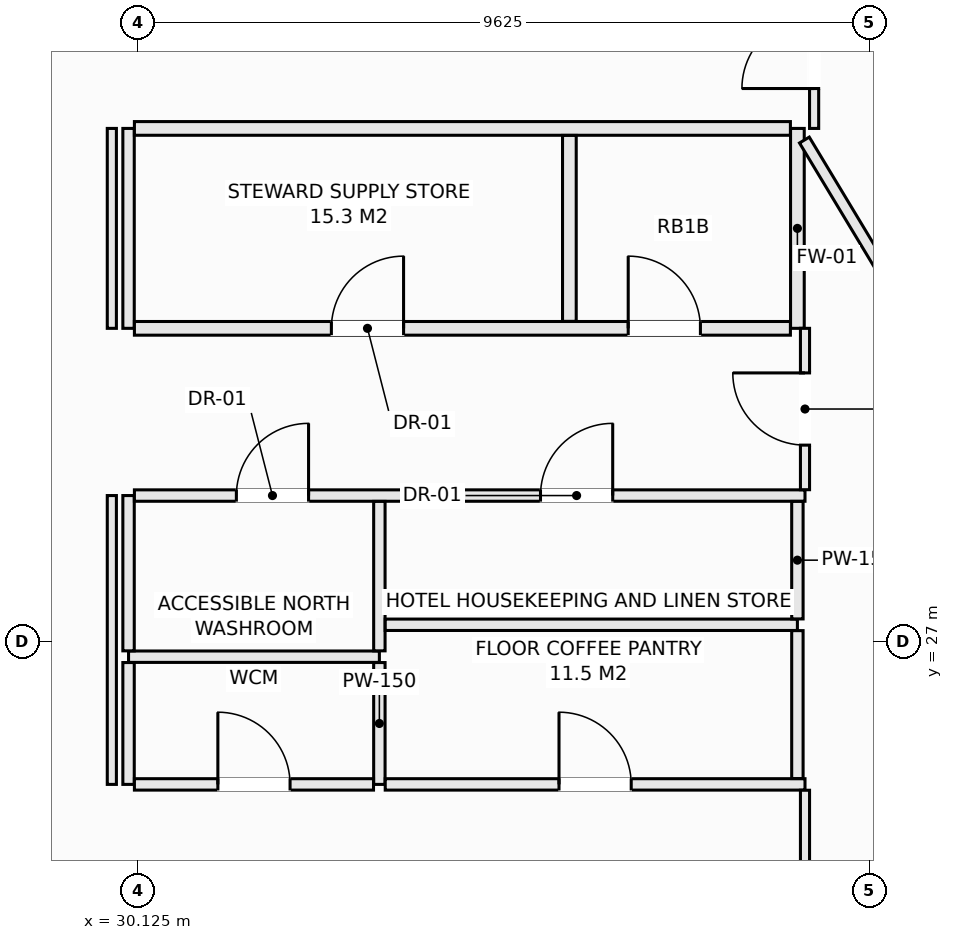
"""IFC4 building model, lengths in metres.
Left out: names, types, materials, properties, quantities, classifications, styles, units other than length and angle.
Written with IfcOpenShell. Run it as: python <this file> out.ifc"""

import sys

from ifc_helpers import new_model, si_unit, direction, frame, frame_2d, origin, place, context, subcontext, project, spatial, rectangle, extrude, element, fill, save


model = new_model("IFC4")
c1 = context("Model", 3, precision=1e-05, world=origin(), true_north=direction((0.0, 1.0)))
c2 = subcontext(c1, "Body", "Model", "MODEL_VIEW")
j1 = project(units=[si_unit("LENGTHUNIT", "METRE"), si_unit("PLANEANGLEUNIT", "RADIAN")], contexts=[c1])
p1 = place(None, origin())
s1 = spatial("IfcSite", under=j1, at=p1, CompositionType="ELEMENT")
p2 = place(p1, origin())
s2 = spatial("IfcBuilding", under=s1, at=p2, CompositionType="ELEMENT")
p3 = place(p2, frame((0.0, 0.0, 135.9)))
s3 = spatial("IfcBuildingStorey", under=s2, at=p3, CompositionType="ELEMENT", Elevation=135.9)
p4 = place(p3, frame((30.0, 26.8, 0.0), z_axis=(0.0, 0.0, 1.0), x_axis=(1.0, 0.0, 0.0)))
e1 = element("IfcWall", 1, at=p4, inside=s3, PredefinedType="PARTITIONING", context=c2, shape_type="SweptSolid", body=[
    extrude(rectangle(XDim=3.3, YDim=0.15, at=frame_2d((1.65, 0.0))), origin(), (0.0, 0.0, 1.0), 3.13),
])
p5 = place(p3, frame((30.0, 25.12, 0.0), z_axis=(0.0, 0.0, 1.0), x_axis=(0.0, 1.0, 0.0)))
e2 = element("IfcWall", 2, at=p5, inside=s3, PredefinedType="PARTITIONING", context=c2, shape_type="SweptSolid", body=[
    extrude(rectangle(XDim=1.603, YDim=0.15, at=frame_2d((0.801, 0.0))), origin(), (0.0, 0.0, 1.0), 3.13),
])
p6 = place(p3, frame((30.0, 26.877, 0.0), z_axis=(0.0, 0.0, 1.0), x_axis=(0.0, 1.0, 0.0)))
e3 = element("IfcWall", 3, at=p6, inside=s3, PredefinedType="PARTITIONING", context=c2, shape_type="SweptSolid", body=[
    extrude(rectangle(XDim=2.043, YDim=0.15, at=frame_2d((1.021, 0.0))), origin(), (0.0, 0.0, 1.0), 3.13),
])
p7 = place(p3, frame((30.0, 31.12, 0.0), z_axis=(0.0, 0.0, 1.0), x_axis=(0.0, 1.0, 0.0)))
e4 = element("IfcWall", 4, at=p7, inside=s3, PredefinedType="PARTITIONING", context=c2, shape_type="SweptSolid", body=[
    extrude(rectangle(XDim=2.63, YDim=0.15, at=frame_2d((1.315, 0.0))), origin(), (0.0, 0.0, 1.0), 3.13),
])
p8 = place(p3, frame((30.077, 28.92, 0.0), z_axis=(0.0, 0.0, 1.0), x_axis=(1.0, 0.0, 0.0)))
e5 = element("IfcWall", 5, at=p8, inside=s3, PredefinedType="PARTITIONING", context=c2, shape_type="SweptSolid", body=[
    extrude(rectangle(XDim=8.823, YDim=0.15, at=frame_2d((4.412, 0.0))), origin(), (0.0, 0.0, 1.0), 3.13),
])
p9 = place(p8, frame((1.342, 0.0, 0.0)))
e6 = element("IfcOpeningElement", 6, at=p9, cuts=e5, PredefinedType="OPENING", context=c2, shape_type="SweptSolid", body=[
    extrude(rectangle(XDim=0.95, YDim=2.1, at=frame_2d((0.475, 1.05))), frame((0.0, 0.085, 0.0), z_axis=(0.0, -1.0, 0.0), x_axis=(1.0, 0.0, 0.0)), (0.0, 0.0, 1.0), 0.17),
])
p10 = place(p8, frame((5.343, 0.0, 0.0)))
e7 = element("IfcOpeningElement", 7, at=p10, cuts=e5, PredefinedType="OPENING", context=c2, shape_type="SweptSolid", body=[
    extrude(rectangle(XDim=0.95, YDim=2.1, at=frame_2d((0.475, 1.05))), frame((0.0, 0.085, 0.0), z_axis=(0.0, -1.0, 0.0), x_axis=(1.0, 0.0, 0.0)), (0.0, 0.0, 1.0), 0.17),
])
p11 = place(p3, frame((33.3, 25.12, 0.0), z_axis=(0.0, 0.0, 1.0), x_axis=(0.0, 1.0, 0.0)))
e8 = element("IfcWall", 8, at=p11, inside=s3, PredefinedType="PARTITIONING", context=c2, shape_type="SweptSolid", body=[
    extrude(rectangle(XDim=1.603, YDim=0.15, at=frame_2d((0.801, 0.0))), origin(), (0.0, 0.0, 1.0), 3.13),
])
p12 = place(p3, frame((33.3, 26.877, 0.0), z_axis=(0.0, 0.0, 1.0), x_axis=(0.0, 1.0, 0.0)))
e9 = element("IfcWall", 9, at=p12, inside=s3, PredefinedType="PARTITIONING", context=c2, shape_type="SweptSolid", body=[
    extrude(rectangle(XDim=1.966, YDim=0.15, at=frame_2d((0.983, 0.0))), origin(), (0.0, 0.0, 1.0), 3.13),
])
p13 = place(p3, frame((30.077, 25.12, 0.0), z_axis=(0.0, 0.0, 1.0), x_axis=(1.0, 0.0, 0.0)))
e10 = element("IfcWall", 10, at=p13, inside=s3, PredefinedType="PARTITIONING", context=c2, shape_type="SweptSolid", body=[
    extrude(rectangle(XDim=3.146, YDim=0.15, at=frame_2d((1.573, 0.0))), origin(), (0.0, 0.0, 1.0), 3.13),
])
p14 = place(p13, frame((1.098, 0.0, 0.0)))
e11 = element("IfcOpeningElement", 11, at=p14, cuts=e10, PredefinedType="OPENING", context=c2, shape_type="SweptSolid", body=[
    extrude(rectangle(XDim=0.95, YDim=2.1, at=frame_2d((0.475, 1.05))), frame((0.0, 0.085, 0.0), z_axis=(0.0, -1.0, 0.0), x_axis=(1.0, 0.0, 0.0)), (0.0, 0.0, 1.0), 0.17),
])
p15 = place(p3, frame((33.377, 25.12, 0.0), z_axis=(0.0, 0.0, 1.0), x_axis=(1.0, 0.0, 0.0)))
e12 = element("IfcWall", 12, at=p15, inside=s3, PredefinedType="PARTITIONING", context=c2, shape_type="SweptSolid", body=[
    extrude(rectangle(XDim=5.523, YDim=0.15, at=frame_2d((2.761, 0.0))), origin(), (0.0, 0.0, 1.0), 3.13),
])
p16 = place(p15, frame((2.287, 0.0, 0.0)))
e13 = element("IfcOpeningElement", 13, at=p16, cuts=e12, PredefinedType="OPENING", context=c2, shape_type="SweptSolid", body=[
    extrude(rectangle(XDim=0.95, YDim=2.1, at=frame_2d((0.475, 1.05))), frame((0.0, 0.085, 0.0), z_axis=(0.0, -1.0, 0.0), x_axis=(1.0, 0.0, 0.0)), (0.0, 0.0, 1.0), 0.17),
])
p17 = place(p3, frame((33.377, 27.22, 0.0), z_axis=(0.0, 0.0, 1.0), x_axis=(1.0, 0.0, 0.0)))
e14 = element("IfcWall", 14, at=p17, inside=s3, PredefinedType="PARTITIONING", context=c2, shape_type="SweptSolid", body=[
    extrude(rectangle(XDim=5.423, YDim=0.15, at=frame_2d((2.711, 0.0))), origin(), (0.0, 0.0, 1.0), 3.13),
])
p18 = place(p3, frame((38.8, 25.197, 0.0), z_axis=(0.0, 0.0, 1.0), x_axis=(0.0, 1.0, 0.0)))
e15 = element("IfcWall", 15, at=p18, inside=s3, PredefinedType="PARTITIONING", context=c2, shape_type="SweptSolid", body=[
    extrude(rectangle(XDim=1.946, YDim=0.15, at=frame_2d((0.973, 0.0))), origin(), (0.0, 0.0, 1.0), 3.13),
])
p19 = place(p3, frame((38.8, 27.297, 0.0), z_axis=(0.0, 0.0, 1.0), x_axis=(0.0, 1.0, 0.0)))
e16 = element("IfcWall", 16, at=p19, inside=s3, PredefinedType="PARTITIONING", context=c2, shape_type="SweptSolid", body=[
    extrude(rectangle(XDim=1.546, YDim=0.15, at=frame_2d((0.773, 0.0))), origin(), (0.0, 0.0, 1.0), 3.13),
])
p20 = place(p3, frame((38.8, 31.12, 0.0), z_axis=(0.0, 0.0, 1.0), x_axis=(0.0, 1.0, 0.0)))
e17 = element("IfcWall", 17, at=p20, inside=s3, PredefinedType="SOLIDWALL", context=c2, shape_type="SweptSolid", body=[
    extrude(rectangle(XDim=2.63, YDim=0.18, at=frame_2d((1.315, 0.0))), origin(), (0.0, 0.0, 1.0), 3.13),
])
p21 = place(p3, frame((30.077, 31.12, 0.0), z_axis=(0.0, 0.0, 1.0), x_axis=(1.0, 0.0, 0.0)))
e18 = element("IfcWall", 18, at=p21, inside=s3, PredefinedType="SOLIDWALL", context=c2, shape_type="SweptSolid", body=[
    extrude(rectangle(XDim=8.631, YDim=0.18, at=frame_2d((4.315, 0.0))), origin(), (0.0, 0.0, 1.0), 3.13),
])
p22 = place(p21, frame((2.592, 0.0, 0.0)))
e19 = element("IfcOpeningElement", 19, at=p22, cuts=e18, PredefinedType="OPENING", context=c2, shape_type="SweptSolid", body=[
    extrude(rectangle(XDim=0.95, YDim=2.1, at=frame_2d((0.475, 1.05))), frame((0.0, 0.1, 0.0), z_axis=(0.0, -1.0, 0.0), x_axis=(1.0, 0.0, 0.0)), (0.0, 0.0, 1.0), 0.2),
])
p23 = place(p21, frame((6.497, 0.0, 0.0)))
e20 = element("IfcOpeningElement", 20, at=p23, cuts=e18, PredefinedType="OPENING", context=c2, shape_type="SweptSolid", body=[
    extrude(rectangle(XDim=0.95, YDim=2.1, at=frame_2d((0.475, 1.05))), frame((0.0, 0.1, 0.0), z_axis=(0.0, -1.0, 0.0), x_axis=(1.0, 0.0, 0.0)), (0.0, 0.0, 1.0), 0.2),
])
p24 = place(p3, frame((30.077, 33.75, 0.0), z_axis=(0.0, 0.0, 1.0), x_axis=(1.0, 0.0, 0.0)))
e21 = element("IfcWall", 21, at=p24, inside=s3, PredefinedType="SOLIDWALL", context=c2, shape_type="SweptSolid", body=[
    extrude(rectangle(XDim=8.631, YDim=0.18, at=frame_2d((4.315, 0.0))), origin(), (0.0, 0.0, 1.0), 3.13),
])
p25 = place(p3, frame((35.8, 31.212, 0.0), z_axis=(0.0, 0.0, 1.0), x_axis=(0.0, 1.0, 0.0)))
e22 = element("IfcWall", 22, at=p25, inside=s3, PredefinedType="SOLIDWALL", context=c2, shape_type="SweptSolid", body=[
    extrude(rectangle(XDim=2.446, YDim=0.18, at=frame_2d((1.223, 0.0))), origin(), (0.0, 0.0, 1.0), 3.13),
])
p26 = place(p3, frame((39.02, 33.75, 0.0), z_axis=(0.0, 0.0, 1.0), x_axis=(0.0, 1.0, 0.0)))
e23 = element("IfcWall", 23, at=p26, inside=s3, PredefinedType="PARTITIONING", context=c2, shape_type="SweptSolid", body=[
    extrude(rectangle(XDim=2.0, YDim=0.12, at=frame_2d((1.0, 0.0))), origin(), (0.0, 0.0, 1.0), 3.13),
])
p27 = place(p26, frame((0.525, 0.0, 0.0)))
e24 = element("IfcOpeningElement", 24, at=p27, cuts=e23, PredefinedType="OPENING", context=c2, shape_type="SweptSolid", body=[
    extrude(rectangle(XDim=0.95, YDim=2.1, at=frame_2d((0.475, 1.05))), frame((0.0, 0.07, 0.0), z_axis=(0.0, -1.0, 0.0), x_axis=(1.0, 0.0, 0.0)), (0.0, 0.0, 1.0), 0.14),
])
p28 = place(p3, frame((29.78, 25.12, 0.0), z_axis=(0.0, 0.0, 1.0), x_axis=(0.0, 1.0, 0.0)))
e25 = element("IfcWall", 25, at=p28, inside=s3, PredefinedType="PARTITIONING", context=c2, shape_type="SweptSolid", body=[
    extrude(rectangle(XDim=3.8, YDim=0.12, at=frame_2d((1.9, 0.0))), origin(), (0.0, 0.0, 1.0), 3.13),
])
p29 = place(p3, frame((29.78, 31.12, 0.0), z_axis=(0.0, 0.0, 1.0), x_axis=(0.0, 1.0, 0.0)))
e26 = element("IfcWall", 26, at=p29, inside=s3, PredefinedType="PARTITIONING", context=c2, shape_type="SweptSolid", body=[
    extrude(rectangle(XDim=2.63, YDim=0.12, at=frame_2d((1.315, 0.0))), origin(), (0.0, 0.0, 1.0), 3.13),
])
p30 = place(p3, frame((38.9, 23.02, 0.0), z_axis=(0.0, 0.0, 1.0), x_axis=(0.0, 1.0, 0.0)))
e27 = element("IfcWall", 27, at=p30, inside=s3, PredefinedType="PARTITIONING", context=c2, shape_type="SweptSolid", body=[
    extrude(rectangle(XDim=2.023, YDim=0.12, at=frame_2d((1.011, 0.0))), origin(), (0.0, 0.0, 1.0), 3.13),
])
p31 = place(p3, frame((38.9, 28.997, 0.0), z_axis=(0.0, 0.0, 1.0), x_axis=(0.0, 1.0, 0.0)))
e28 = element("IfcWall", 28, at=p31, inside=s3, PredefinedType="PARTITIONING", context=c2, shape_type="SweptSolid", body=[
    extrude(rectangle(XDim=2.123, YDim=0.12, at=frame_2d((1.062, 0.0))), origin(), (0.0, 0.0, 1.0), 3.13),
])
p32 = place(p31, frame((0.586, 0.0, 0.0)))
e29 = element("IfcOpeningElement", 29, at=p32, cuts=e28, PredefinedType="OPENING", context=c2, shape_type="SweptSolid", body=[
    extrude(rectangle(XDim=0.95, YDim=2.1, at=frame_2d((0.475, 1.05))), frame((0.0, 0.07, 0.0), z_axis=(0.0, -1.0, 0.0), x_axis=(1.0, 0.0, 0.0)), (0.0, 0.0, 1.0), 0.14),
])
p33 = place(p3, frame((38.892, 33.597, 0.0), z_axis=(0.0, 0.0, 1.0), x_axis=(0.516074687683, -0.856543587176, 0.0)))
e30 = element("IfcWall", 30, at=p33, inside=s3, PredefinedType="PARTITIONING", context=c2, shape_type="SweptSolid", body=[
    extrude(rectangle(XDim=19.476, YDim=0.15, at=frame_2d((9.738, 0.0))), origin(), (0.0, 0.0, 1.0), 2.505),
])
p34 = place(p3, frame((35.479, 40.488, 0.0), z_axis=(0.0, 0.0, 1.0), x_axis=(0.636055982797, -0.771642914014, 0.0)))
e31 = element("IfcWall", 31, at=p34, inside=s3, PredefinedType="PARTITIONING", context=c2, shape_type="SweptSolid", body=[
    extrude(rectangle(XDim=26.473, YDim=0.12, at=frame_2d((13.236, 0.0))), origin(), (0.0, 0.0, 1.0), 2.812),
])
p35 = place(p9, origin())
e32 = element("IfcDoor", 32, at=p35, inside=s3, OperationType="SINGLE_SWING_RIGHT", PredefinedType="DOOR", context=c2, shape_type="SweptSolid", body=[
    extrude(rectangle(XDim=0.95, YDim=2.1, at=frame_2d((0.475, 1.05))), frame((0.0, 0.025, 0.0), z_axis=(0.0, -1.0, 0.0), x_axis=(1.0, 0.0, 0.0)), (0.0, 0.0, 1.0), 0.05),
])
fill(e6, e32)
p36 = place(p14, origin())
e33 = element("IfcDoor", 33, at=p36, inside=s3, OperationType="SINGLE_SWING_LEFT", PredefinedType="DOOR", context=c2, shape_type="SweptSolid", body=[
    extrude(rectangle(XDim=0.95, YDim=2.1, at=frame_2d((0.475, 1.05))), frame((0.0, 0.025, 0.0), z_axis=(0.0, -1.0, 0.0), x_axis=(1.0, 0.0, 0.0)), (0.0, 0.0, 1.0), 0.05),
])
fill(e11, e33)
p37 = place(p10, origin())
e34 = element("IfcDoor", 34, at=p37, inside=s3, OperationType="SINGLE_SWING_RIGHT", PredefinedType="DOOR", context=c2, shape_type="SweptSolid", body=[
    extrude(rectangle(XDim=0.95, YDim=2.1, at=frame_2d((0.475, 1.05))), frame((0.0, 0.025, 0.0), z_axis=(0.0, -1.0, 0.0), x_axis=(1.0, 0.0, 0.0)), (0.0, 0.0, 1.0), 0.05),
])
fill(e7, e34)
p38 = place(p16, origin())
e35 = element("IfcDoor", 35, at=p38, inside=s3, OperationType="SINGLE_SWING_LEFT", PredefinedType="DOOR", context=c2, shape_type="SweptSolid", body=[
    extrude(rectangle(XDim=0.95, YDim=2.1, at=frame_2d((0.475, 1.05))), frame((0.0, 0.025, 0.0), z_axis=(0.0, -1.0, 0.0), x_axis=(1.0, 0.0, 0.0)), (0.0, 0.0, 1.0), 0.05),
])
fill(e13, e35)
p39 = place(p22, origin())
e36 = element("IfcDoor", 36, at=p39, inside=s3, OperationType="SINGLE_SWING_RIGHT", PredefinedType="DOOR", context=c2, shape_type="SweptSolid", body=[
    extrude(rectangle(XDim=0.95, YDim=2.1, at=frame_2d((0.475, 1.05))), frame((0.0, 0.025, 0.0), z_axis=(0.0, -1.0, 0.0), x_axis=(1.0, 0.0, 0.0)), (0.0, 0.0, 1.0), 0.05),
])
fill(e19, e36)
p40 = place(p23, origin())
e37 = element("IfcDoor", 37, at=p40, inside=s3, OperationType="SINGLE_SWING_LEFT", PredefinedType="DOOR", context=c2, shape_type="SweptSolid", body=[
    extrude(rectangle(XDim=0.95, YDim=2.1, at=frame_2d((0.475, 1.05))), frame((0.0, 0.025, 0.0), z_axis=(0.0, -1.0, 0.0), x_axis=(1.0, 0.0, 0.0)), (0.0, 0.0, 1.0), 0.05),
])
fill(e20, e37)
p41 = place(p32, origin())
e38 = element("IfcDoor", 38, at=p41, inside=s3, OperationType="SINGLE_SWING_RIGHT", PredefinedType="DOOR", context=c2, shape_type="SweptSolid", body=[
    extrude(rectangle(XDim=0.95, YDim=2.1, at=frame_2d((0.475, 1.05))), frame((0.0, 0.025, 0.0), z_axis=(0.0, -1.0, 0.0), x_axis=(1.0, 0.0, 0.0)), (0.0, 0.0, 1.0), 0.05),
])
fill(e29, e38)
p42 = place(p27, origin())
e39 = element("IfcDoor", 39, at=p42, inside=s3, OperationType="SINGLE_SWING_LEFT", PredefinedType="DOOR", context=c2, shape_type="SweptSolid", body=[
    extrude(rectangle(XDim=0.95, YDim=2.1, at=frame_2d((0.475, 1.05))), frame((0.0, 0.025, 0.0), z_axis=(0.0, -1.0, 0.0), x_axis=(1.0, 0.0, 0.0)), (0.0, 0.0, 1.0), 0.05),
])
fill(e24, e39)
save(model, sys.argv[1])
